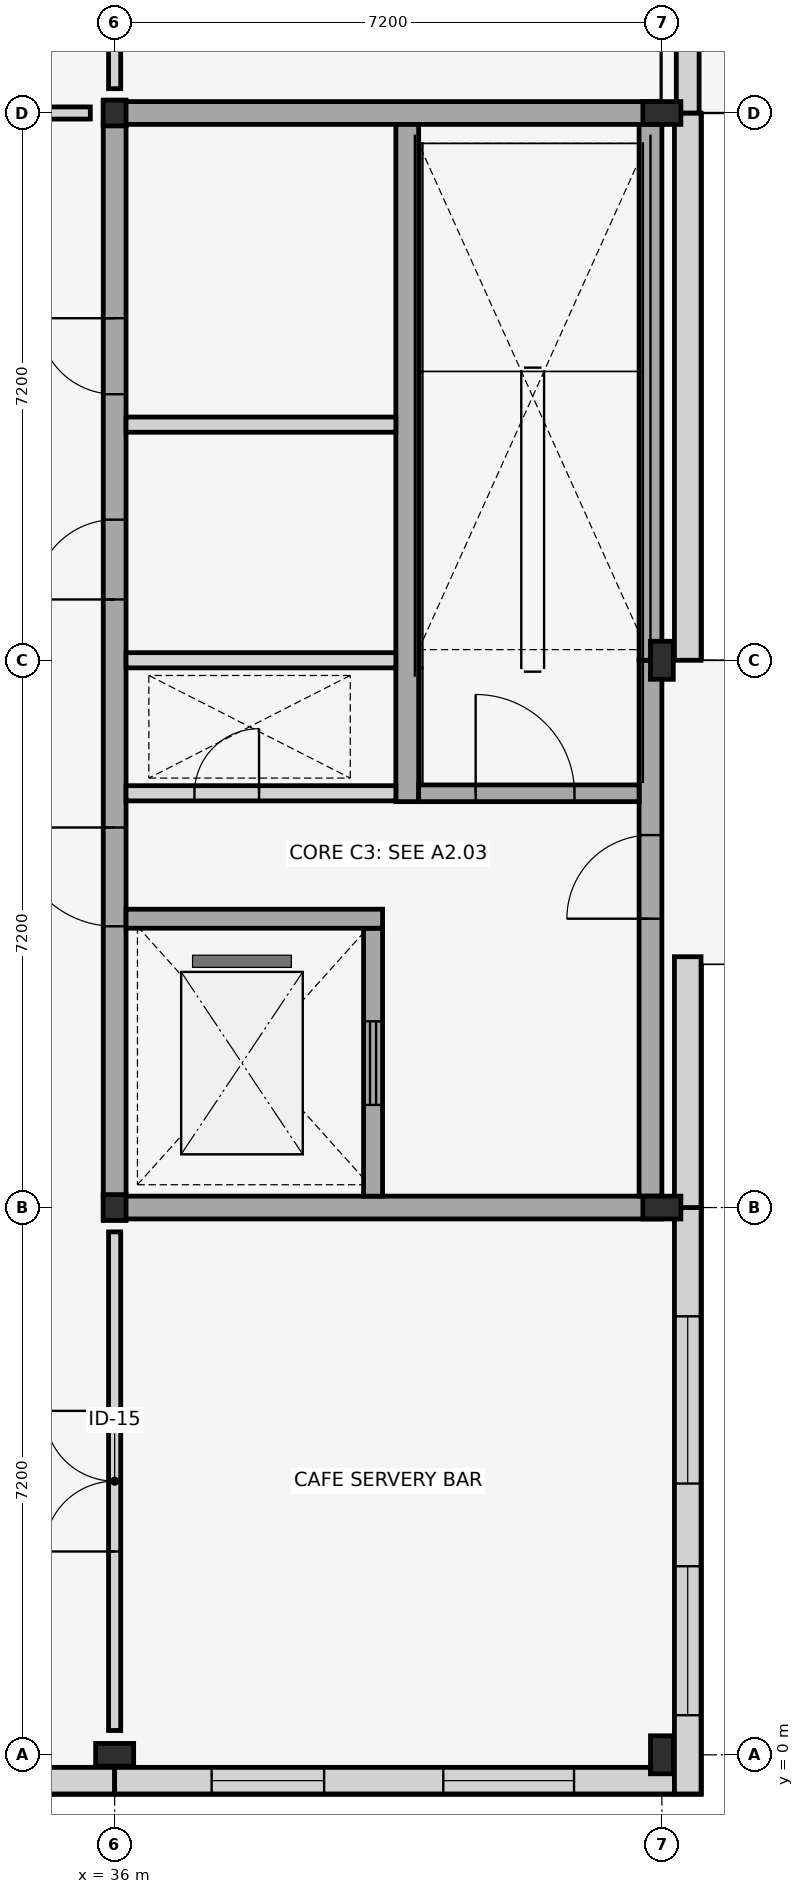
"""IFC4 building model, lengths in metres.
Left out: names, types, materials, properties, quantities, classifications, styles, units other than length and angle.
Written with IfcOpenShell. Run it as: python <this file> out.ifc"""

import sys

from ifc_helpers import new_model, si_unit, direction, frame, frame_2d, origin, origin_2d, place, context, subcontext, project, spatial, rectangle, i_section, extrude, element, fill, save


model = new_model("IFC4")
c1 = context("Model", 3, precision=1e-05, world=origin(), true_north=direction((0.0, 1.0)))
c2 = subcontext(c1, "Body", "Model", "MODEL_VIEW")
j1 = project(units=[si_unit("LENGTHUNIT", "METRE"), si_unit("PLANEANGLEUNIT", "RADIAN")], contexts=[c1])
p1 = place(None, origin())
s1 = spatial("IfcSite", under=j1, at=p1, CompositionType="ELEMENT")
p2 = place(p1, origin())
s2 = spatial("IfcBuilding", under=s1, at=p2, CompositionType="ELEMENT")
p3 = place(p2, origin())
s3 = spatial("IfcBuildingStorey", under=s2, at=p3, CompositionType="ELEMENT", Elevation=0.0)
p4 = place(p3, frame((36.0, 0.0, 0.0), z_axis=(0.0, 0.0, 1.0), x_axis=(0.0, 1.0, 0.0)))
e1 = element("IfcColumn", 1, at=p4, inside=s3, PredefinedType="COLUMN", context=c2, shape_type="SweptSolid", body=[
    extrude(i_section(OverallWidth=0.3, OverallDepth=0.5, WebThickness=0.014, FlangeThickness=0.028, FilletRadius=0.027, at=origin_2d()), origin(), (0.0, 0.0, 1.0), 4.5),
])
for number, where, z_axis, x_axis in (
    (2, (36.0, 7.2, 0.0), (0.0, 0.0, 1.0), (1.0, 0.0, 0.0)),
    (3, (36.0, 21.6, 0.0), (0.0, 0.0, 1.0), (1.0, 0.0, 0.0)),
):
    element("IfcColumn", number, at=place(p3, frame(where, z_axis=z_axis, x_axis=x_axis)), inside=s3, PredefinedType="COLUMN", context=c2, shape_type="SweptSolid", body=[
        extrude(i_section(OverallWidth=0.3, OverallDepth=0.34, WebThickness=0.012, FlangeThickness=0.021, FilletRadius=0.027, at=origin_2d()), origin(), (0.0, 0.0, 1.0), 4.5),
    ])
for number, where, z_axis, x_axis in (
    (4, (43.2, 0.0, 0.0), (0.0, 0.0, 1.0), (1.0, 0.0, 0.0)),
    (5, (43.2, 7.2, 0.0), (0.0, 0.0, 1.0), (0.0, 1.0, 0.0)),
    (6, (43.2, 14.4, 0.0), (0.0, 0.0, 1.0), (1.0, 0.0, 0.0)),
    (7, (43.2, 21.6, 0.0), (0.0, 0.0, 1.0), (0.0, 1.0, 0.0)),
):
    element("IfcColumn", number, at=place(p3, frame(where, z_axis=z_axis, x_axis=x_axis)), inside=s3, PredefinedType="COLUMN", context=c2, shape_type="SweptSolid", body=[
        extrude(i_section(OverallWidth=0.3, OverallDepth=0.5, WebThickness=0.014, FlangeThickness=0.028, FilletRadius=0.027, at=origin_2d()), origin(), (0.0, 0.0, 1.0), 4.5),
    ])
p5 = place(p3, frame((28.8, -0.34, 0.0), z_axis=(0.0, 0.0, 1.0), x_axis=(1.0, 0.0, 0.0)))
e8 = element("IfcWall", 8, at=p5, inside=s3, PredefinedType="STANDARD", context=c2, shape_type="SweptSolid", body=[
    extrude(rectangle(XDim=7.2, YDim=0.35, at=frame_2d((3.6, 0.0))), origin(), (0.0, 0.0, 1.0), 4.5),
])
p6 = place(p5, frame((1.516, 0.0, 0.9)))
e9 = element("IfcOpeningElement", 9, at=p6, cuts=e8, PredefinedType="OPENING", context=c2, shape_type="SweptSolid", body=[
    extrude(rectangle(XDim=1.0, YDim=2.1, at=frame_2d((0.5, 1.05))), frame((0.0, 0.185, 0.0), z_axis=(0.0, -1.0, 0.0), x_axis=(1.0, 0.0, 0.0)), (0.0, 0.0, 1.0), 0.37),
])
p7 = place(p5, frame((4.564, 0.0, 0.9)))
e10 = element("IfcOpeningElement", 10, at=p7, cuts=e8, PredefinedType="OPENING", context=c2, shape_type="SweptSolid", body=[
    extrude(rectangle(XDim=1.24, YDim=2.1, at=frame_2d((0.62, 1.05))), frame((0.0, 0.185, 0.0), z_axis=(0.0, -1.0, 0.0), x_axis=(1.0, 0.0, 0.0)), (0.0, 0.0, 1.0), 0.37),
])
p8 = place(p3, frame((36.0, -0.34, 0.0), z_axis=(0.0, 0.0, 1.0), x_axis=(1.0, 0.0, 0.0)))
e11 = element("IfcWall", 11, at=p8, inside=s3, PredefinedType="STANDARD", context=c2, shape_type="SweptSolid", body=[
    extrude(rectangle(XDim=7.365, YDim=0.35, at=frame_2d((3.683, 0.0))), origin(), (0.0, 0.0, 1.0), 4.5),
])
p9 = place(p8, frame((1.276, 0.0, 0.9)))
e12 = element("IfcOpeningElement", 12, at=p9, cuts=e11, PredefinedType="OPENING", context=c2, shape_type="SweptSolid", body=[
    extrude(rectangle(XDim=1.48, YDim=2.1, at=frame_2d((0.74, 1.05))), frame((0.0, 0.185, 0.0), z_axis=(0.0, -1.0, 0.0), x_axis=(1.0, 0.0, 0.0)), (0.0, 0.0, 1.0), 0.37),
])
p10 = place(p8, frame((4.324, 0.0, 0.9)))
e13 = element("IfcOpeningElement", 13, at=p10, cuts=e11, PredefinedType="OPENING", context=c2, shape_type="SweptSolid", body=[
    extrude(rectangle(XDim=1.72, YDim=2.1, at=frame_2d((0.86, 1.05))), frame((0.0, 0.185, 0.0), z_axis=(0.0, -1.0, 0.0), x_axis=(1.0, 0.0, 0.0)), (0.0, 0.0, 1.0), 0.37),
])
p11 = place(p3, frame((43.54, -0.515, 0.0), z_axis=(0.0, 0.0, 1.0), x_axis=(0.0, 1.0, 0.0)))
e14 = element("IfcWall", 14, at=p11, inside=s3, PredefinedType="STANDARD", context=c2, shape_type="SweptSolid", body=[
    extrude(rectangle(XDim=7.715, YDim=0.35, at=frame_2d((3.857, 0.0))), origin(), (0.0, 0.0, 1.0), 4.5),
])
p12 = place(p11, frame((1.036, 0.0, 0.9)))
e15 = element("IfcOpeningElement", 15, at=p12, cuts=e14, PredefinedType="OPENING", context=c2, shape_type="SweptSolid", body=[
    extrude(rectangle(XDim=1.96, YDim=2.1, at=frame_2d((0.98, 1.05))), frame((0.0, 0.185, 0.0), z_axis=(0.0, -1.0, 0.0), x_axis=(1.0, 0.0, 0.0)), (0.0, 0.0, 1.0), 0.37),
])
p13 = place(p11, frame((4.084, 0.0, 0.9)))
e16 = element("IfcOpeningElement", 16, at=p13, cuts=e14, PredefinedType="OPENING", context=c2, shape_type="SweptSolid", body=[
    extrude(rectangle(XDim=2.2, YDim=2.1, at=frame_2d((1.1, 1.05))), frame((0.0, 0.185, 0.0), z_axis=(0.0, -1.0, 0.0), x_axis=(1.0, 0.0, 0.0)), (0.0, 0.0, 1.0), 0.37),
])
p14 = place(p3, frame((43.54, 7.2, 0.0), z_axis=(0.0, 0.0, 1.0), x_axis=(0.0, 1.0, 0.0)))
e17 = element("IfcWall", 17, at=p14, inside=s3, PredefinedType="STANDARD", context=c2, shape_type="SweptSolid", body=[
    extrude(rectangle(XDim=3.3, YDim=0.35, at=frame_2d((1.65, 0.0))), origin(), (0.0, 0.0, 1.0), 4.5),
])
p15 = place(p3, frame((43.54, 14.4, 0.0), z_axis=(0.0, 0.0, 1.0), x_axis=(0.0, 1.0, 0.0)))
e18 = element("IfcWall", 18, at=p15, inside=s3, PredefinedType="STANDARD", context=c2, shape_type="SweptSolid", body=[
    extrude(rectangle(XDim=7.2, YDim=0.35, at=frame_2d((3.6, 0.0))), origin(), (0.0, 0.0, 1.0), 4.5),
])
p16 = place(p3, frame((43.54, 21.6, 0.0), z_axis=(0.0, 0.0, 1.0), x_axis=(0.0, 1.0, 0.0)))
e19 = element("IfcWall", 19, at=p16, inside=s3, PredefinedType="STANDARD", context=c2, shape_type="SweptSolid", body=[
    extrude(rectangle(XDim=7.715, YDim=0.3, at=frame_2d((3.857, 0.0))), origin(), (0.0, 0.0, 1.0), 3.95),
])
p17 = place(p16, frame((2.65, 0.0, 0.0)))
e20 = element("IfcOpeningElement", 20, at=p17, cuts=e19, PredefinedType="OPENING", context=c2, shape_type="SweptSolid", body=[
    extrude(rectangle(XDim=1.9, YDim=2.45, at=frame_2d((0.95, 1.225))), frame((0.0, 0.16, 0.0), z_axis=(0.0, -1.0, 0.0), x_axis=(1.0, 0.0, 0.0)), (0.0, 0.0, 1.0), 0.32),
])
for number, where, z_axis, x_axis in (
    (21, (35.85, 7.2, 0.0), (0.0, 0.0, 1.0), (1.0, 0.0, 0.0)),
    (22, (35.85, 21.6, 0.0), (0.0, 0.0, 1.0), (1.0, 0.0, 0.0)),
):
    element("IfcWall", number, at=place(p3, frame(where, z_axis=z_axis, x_axis=x_axis)), inside=s3, PredefinedType="SHEAR", context=c2, shape_type="SweptSolid", body=[
        extrude(rectangle(XDim=7.35, YDim=0.3, at=frame_2d((3.675, 0.0))), origin(), (0.0, 0.0, 1.0), 4.28),
    ])
p18 = place(p3, frame((43.05, 7.35, 0.0), z_axis=(0.0, 0.0, 1.0), x_axis=(0.0, 1.0, 0.0)))
e23 = element("IfcWall", 23, at=p18, inside=s3, PredefinedType="SHEAR", context=c2, shape_type="SweptSolid", body=[
    extrude(rectangle(XDim=7.05, YDim=0.3, at=frame_2d((3.525, 0.0))), origin(), (0.0, 0.0, 1.0), 4.28),
])
p19 = place(p18, frame((3.65, 0.0, 0.0)))
e24 = element("IfcOpeningElement", 24, at=p19, cuts=e23, PredefinedType="OPENING", context=c2, shape_type="SweptSolid", body=[
    extrude(rectangle(XDim=1.1, YDim=2.2, at=frame_2d((0.55, 1.1))), frame((0.0, 0.16, 0.0), z_axis=(0.0, -1.0, 0.0), x_axis=(1.0, 0.0, 0.0)), (0.0, 0.0, 1.0), 0.32),
])
p20 = place(p3, frame((43.05, 14.4, 0.0), z_axis=(0.0, 0.0, 1.0), x_axis=(0.0, 1.0, 0.0)))
e25 = element("IfcWall", 25, at=p20, inside=s3, PredefinedType="SHEAR", context=c2, shape_type="SweptSolid", body=[
    extrude(rectangle(XDim=7.05, YDim=0.3, at=frame_2d((3.525, 0.0))), origin(), (0.0, 0.0, 1.0), 4.28),
])
p21 = place(p3, frame((36.0, 7.35, 0.0), z_axis=(0.0, 0.0, 1.0), x_axis=(0.0, 1.0, 0.0)))
e26 = element("IfcWall", 26, at=p21, inside=s3, PredefinedType="SHEAR", context=c2, shape_type="SweptSolid", body=[
    extrude(rectangle(XDim=14.1, YDim=0.3, at=frame_2d((7.05, 0.0))), origin(), (0.0, 0.0, 1.0), 4.28),
])
p22 = place(p21, frame((3.55, 0.0, 0.0)))
e27 = element("IfcOpeningElement", 27, at=p22, cuts=e26, PredefinedType="OPENING", context=c2, shape_type="SweptSolid", body=[
    extrude(rectangle(XDim=1.3, YDim=2.2, at=frame_2d((0.65, 1.1))), frame((0.0, 0.16, 0.0), z_axis=(0.0, -1.0, 0.0), x_axis=(1.0, 0.0, 0.0)), (0.0, 0.0, 1.0), 0.32),
])
p23 = place(p21, frame((7.85, 0.0, 0.0)))
e28 = element("IfcOpeningElement", 28, at=p23, cuts=e26, PredefinedType="OPENING", context=c2, shape_type="SweptSolid", body=[
    extrude(rectangle(XDim=1.05, YDim=2.15, at=frame_2d((0.525, 1.075))), frame((0.0, 0.16, 0.0), z_axis=(0.0, -1.0, 0.0), x_axis=(1.0, 0.0, 0.0)), (0.0, 0.0, 1.0), 0.32),
])
p24 = place(p21, frame((10.55, 0.0, 0.0)))
e29 = element("IfcOpeningElement", 29, at=p24, cuts=e26, PredefinedType="OPENING", context=c2, shape_type="SweptSolid", body=[
    extrude(rectangle(XDim=1.0, YDim=2.15, at=frame_2d((0.5, 1.075))), frame((0.0, 0.16, 0.0), z_axis=(0.0, -1.0, 0.0), x_axis=(1.0, 0.0, 0.0)), (0.0, 0.0, 1.0), 0.32),
])
p25 = place(p3, frame((39.4, 7.35, 0.0), z_axis=(0.0, 0.0, 1.0), x_axis=(0.0, 1.0, 0.0)))
e30 = element("IfcWall", 30, at=p25, inside=s3, PredefinedType="SHEAR", context=c2, shape_type="SweptSolid", body=[
    extrude(rectangle(XDim=3.525, YDim=0.25, at=frame_2d((1.762, 0.0))), origin(), (0.0, 0.0, 1.0), 4.28),
])
p26 = place(p25, frame((1.2, 0.0, 0.0)))
e31 = element("IfcOpeningElement", 31, at=p26, cuts=e30, PredefinedType="OPENING", context=c2, shape_type="SweptSolid", body=[
    extrude(rectangle(XDim=1.1, YDim=2.15, at=frame_2d((0.55, 1.075))), frame((0.0, 0.135, 0.0), z_axis=(0.0, -1.0, 0.0), x_axis=(1.0, 0.0, 0.0)), (0.0, 0.0, 1.0), 0.27),
])
p27 = place(p3, frame((39.85, 12.54, 0.0), z_axis=(0.0, 0.0, 1.0), x_axis=(0.0, 1.0, 0.0)))
e32 = element("IfcWall", 32, at=p27, inside=s3, PredefinedType="SHEAR", context=c2, shape_type="SweptSolid", body=[
    extrude(rectangle(XDim=8.91, YDim=0.3, at=frame_2d((4.455, 0.0))), origin(), (0.0, 0.0, 1.0), 4.28),
])
p28 = place(p3, frame((36.15, 12.65, 0.0), z_axis=(0.0, 0.0, 1.0), x_axis=(1.0, 0.0, 0.0)))
e33 = element("IfcWall", 33, at=p28, inside=s3, PredefinedType="PLUMBINGWALL", context=c2, shape_type="SweptSolid", body=[
    extrude(rectangle(XDim=3.55, YDim=0.2, at=frame_2d((1.775, 0.0))), origin(), (0.0, 0.0, 1.0), 3.7),
])
p29 = place(p28, frame((0.9, 0.0, 0.0)))
e34 = element("IfcOpeningElement", 34, at=p29, cuts=e33, PredefinedType="OPENING", context=c2, shape_type="SweptSolid", body=[
    extrude(rectangle(XDim=0.85, YDim=2.05, at=frame_2d((0.425, 1.025))), frame((0.0, 0.11, 0.0), z_axis=(0.0, -1.0, 0.0), x_axis=(1.0, 0.0, 0.0)), (0.0, 0.0, 1.0), 0.22),
])
p30 = place(p3, frame((40.0, 12.65, 0.0), z_axis=(0.0, 0.0, 1.0), x_axis=(1.0, 0.0, 0.0)))
e35 = element("IfcWall", 35, at=p30, inside=s3, PredefinedType="SHEAR", context=c2, shape_type="SweptSolid", body=[
    extrude(rectangle(XDim=2.9, YDim=0.22, at=frame_2d((1.45, 0.0))), origin(), (0.0, 0.0, 1.0), 4.28),
])
p31 = place(p30, frame((0.75, 0.0, 0.0)))
e36 = element("IfcOpeningElement", 36, at=p31, cuts=e35, PredefinedType="OPENING", context=c2, shape_type="SweptSolid", body=[
    extrude(rectangle(XDim=1.3, YDim=2.2, at=frame_2d((0.65, 1.1))), frame((0.0, 0.12, 0.0), z_axis=(0.0, -1.0, 0.0), x_axis=(1.0, 0.0, 0.0)), (0.0, 0.0, 1.0), 0.24),
])
p32 = place(p3, frame((36.15, 11.0, 0.0), z_axis=(0.0, 0.0, 1.0), x_axis=(1.0, 0.0, 0.0)))
e37 = element("IfcWall", 37, at=p32, inside=s3, PredefinedType="SHEAR", context=c2, shape_type="SweptSolid", body=[
    extrude(rectangle(XDim=3.375, YDim=0.25, at=frame_2d((1.688, 0.0))), origin(), (0.0, 0.0, 1.0), 4.28),
])
for number, where, z_axis, x_axis in (
    (38, (36.15, 14.4, 0.0), (0.0, 0.0, 1.0), (1.0, 0.0, 0.0)),
    (39, (36.15, 17.5, 0.0), (0.0, 0.0, 1.0), (1.0, 0.0, 0.0)),
):
    element("IfcWall", number, at=place(p3, frame(where, z_axis=z_axis, x_axis=x_axis)), inside=s3, PredefinedType="PLUMBINGWALL", context=c2, shape_type="SweptSolid", body=[
        extrude(rectangle(XDim=3.55, YDim=0.2, at=frame_2d((1.775, 0.0))), origin(), (0.0, 0.0, 1.0), 3.7),
    ])
p33 = place(p3, frame((29.12, 21.6, 0.0), z_axis=(0.0, 0.0, 1.0), x_axis=(1.0, 0.0, 0.0)))
e40 = element("IfcWall", 40, at=p33, inside=s3, PredefinedType="PARTITIONING", context=c2, shape_type="SweptSolid", body=[
    extrude(rectangle(XDim=6.56, YDim=0.16, at=frame_2d((3.28, 0.0))), origin(), (0.0, 0.0, 1.0), 3.45),
])
p34 = place(p33, frame((2.405, 0.0, 0.0)))
e41 = element("IfcOpeningElement", 41, at=p34, cuts=e40, PredefinedType="OPENING", context=c2, shape_type="SweptSolid", body=[
    extrude(rectangle(XDim=1.75, YDim=2.45, at=frame_2d((0.875, 1.225))), frame((0.0, 0.09, 0.0), z_axis=(0.0, -1.0, 0.0), x_axis=(1.0, 0.0, 0.0)), (0.0, 0.0, 1.0), 0.18),
])
p35 = place(p3, frame((36.0, 0.32, 0.0), z_axis=(0.0, 0.0, 1.0), x_axis=(0.0, 1.0, 0.0)))
e42 = element("IfcWall", 42, at=p35, inside=s3, PredefinedType="PARTITIONING", context=c2, shape_type="SweptSolid", body=[
    extrude(rectangle(XDim=6.56, YDim=0.16, at=frame_2d((3.28, 0.0))), origin(), (0.0, 0.0, 1.0), 3.45),
])
p36 = place(p35, frame((2.355, 0.0, 0.0)))
e43 = element("IfcOpeningElement", 43, at=p36, cuts=e42, PredefinedType="OPENING", context=c2, shape_type="SweptSolid", body=[
    extrude(rectangle(XDim=1.85, YDim=2.5, at=frame_2d((0.925, 1.25))), frame((0.0, 0.09, 0.0), z_axis=(0.0, -1.0, 0.0), x_axis=(1.0, 0.0, 0.0)), (0.0, 0.0, 1.0), 0.18),
])
p37 = place(p3, frame((36.0, 21.92, 0.0), z_axis=(0.0, 0.0, 1.0), x_axis=(0.0, 1.0, 0.0)))
e44 = element("IfcWall", 44, at=p37, inside=s3, PredefinedType="PARTITIONING", context=c2, shape_type="SweptSolid", body=[
    extrude(rectangle(XDim=6.56, YDim=0.16, at=frame_2d((3.28, 0.0))), origin(), (0.0, 0.0, 1.0), 3.45),
])
p38 = place(p37, frame((2.255, 0.0, 0.0)))
e45 = element("IfcOpeningElement", 45, at=p38, cuts=e44, PredefinedType="OPENING", context=c2, shape_type="SweptSolid", body=[
    extrude(rectangle(XDim=2.05, YDim=2.55, at=frame_2d((1.025, 1.275))), frame((0.0, 0.09, 0.0), z_axis=(0.0, -1.0, 0.0), x_axis=(1.0, 0.0, 0.0)), (0.0, 0.0, 1.0), 0.18),
])
p39 = place(p9, origin())
e46 = element("IfcWindow", 46, at=p39, inside=s3, PartitioningType="SINGLE_PANEL", PredefinedType="WINDOW", context=c2, shape_type="SweptSolid", body=[
    extrude(rectangle(XDim=1.48, YDim=2.1, at=frame_2d((0.74, 1.05))), frame((0.0, 0.03, 0.0), z_axis=(0.0, -1.0, 0.0), x_axis=(1.0, 0.0, 0.0)), (0.0, 0.0, 1.0), 0.06),
])
fill(e12, e46)
p40 = place(p10, origin())
e47 = element("IfcWindow", 47, at=p40, inside=s3, PartitioningType="SINGLE_PANEL", PredefinedType="WINDOW", context=c2, shape_type="SweptSolid", body=[
    extrude(rectangle(XDim=1.72, YDim=2.1, at=frame_2d((0.86, 1.05))), frame((0.0, 0.03, 0.0), z_axis=(0.0, -1.0, 0.0), x_axis=(1.0, 0.0, 0.0)), (0.0, 0.0, 1.0), 0.06),
])
fill(e13, e47)
p41 = place(p12, origin())
e48 = element("IfcWindow", 48, at=p41, inside=s3, PartitioningType="SINGLE_PANEL", PredefinedType="WINDOW", context=c2, shape_type="SweptSolid", body=[
    extrude(rectangle(XDim=1.96, YDim=2.1, at=frame_2d((0.98, 1.05))), frame((0.0, 0.03, 0.0), z_axis=(0.0, -1.0, 0.0), x_axis=(1.0, 0.0, 0.0)), (0.0, 0.0, 1.0), 0.06),
])
fill(e15, e48)
p42 = place(p13, origin())
e49 = element("IfcWindow", 49, at=p42, inside=s3, PartitioningType="SINGLE_PANEL", PredefinedType="WINDOW", context=c2, shape_type="SweptSolid", body=[
    extrude(rectangle(XDim=2.2, YDim=2.1, at=frame_2d((1.1, 1.05))), frame((0.0, 0.03, 0.0), z_axis=(0.0, -1.0, 0.0), x_axis=(1.0, 0.0, 0.0)), (0.0, 0.0, 1.0), 0.06),
])
fill(e16, e49)
p43 = place(p19, origin())
e50 = element("IfcDoor", 50, at=p43, inside=s3, OperationType="SINGLE_SWING_LEFT", PredefinedType="DOOR", context=c2, shape_type="SweptSolid", body=[
    extrude(rectangle(XDim=1.1, YDim=2.2, at=frame_2d((0.55, 1.1))), frame((0.0, 0.025, 0.0), z_axis=(0.0, -1.0, 0.0), x_axis=(1.0, 0.0, 0.0)), (0.0, 0.0, 1.0), 0.05),
])
fill(e24, e50)
p44 = place(p22, origin())
e51 = element("IfcDoor", 51, at=p44, inside=s3, OperationType="SINGLE_SWING_RIGHT", PredefinedType="DOOR", context=c2, shape_type="SweptSolid", body=[
    extrude(rectangle(XDim=1.3, YDim=2.2, at=frame_2d((0.65, 1.1))), frame((0.0, 0.025, 0.0), z_axis=(0.0, -1.0, 0.0), x_axis=(1.0, 0.0, 0.0)), (0.0, 0.0, 1.0), 0.05),
])
fill(e27, e51)
p45 = place(p23, origin())
e52 = element("IfcDoor", 52, at=p45, inside=s3, OperationType="SINGLE_SWING_LEFT", PredefinedType="DOOR", context=c2, shape_type="SweptSolid", body=[
    extrude(rectangle(XDim=1.05, YDim=2.15, at=frame_2d((0.525, 1.075))), frame((0.0, 0.025, 0.0), z_axis=(0.0, -1.0, 0.0), x_axis=(1.0, 0.0, 0.0)), (0.0, 0.0, 1.0), 0.05),
])
fill(e28, e52)
p46 = place(p24, origin())
e53 = element("IfcDoor", 53, at=p46, inside=s3, OperationType="SINGLE_SWING_RIGHT", PredefinedType="DOOR", context=c2, shape_type="SweptSolid", body=[
    extrude(rectangle(XDim=1.0, YDim=2.15, at=frame_2d((0.5, 1.075))), frame((0.0, 0.025, 0.0), z_axis=(0.0, -1.0, 0.0), x_axis=(1.0, 0.0, 0.0)), (0.0, 0.0, 1.0), 0.05),
])
fill(e29, e53)
p47 = place(p26, origin())
e54 = element("IfcDoor", 54, at=p47, inside=s3, OperationType="SLIDING_TO_LEFT", PredefinedType="DOOR", context=c2, shape_type="SweptSolid", body=[
    extrude(rectangle(XDim=1.1, YDim=2.15, at=frame_2d((0.55, 1.075))), frame((0.0, 0.025, 0.0), z_axis=(0.0, -1.0, 0.0), x_axis=(1.0, 0.0, 0.0)), (0.0, 0.0, 1.0), 0.05),
])
fill(e31, e54)
p48 = place(p29, origin())
e55 = element("IfcDoor", 55, at=p48, inside=s3, OperationType="SINGLE_SWING_RIGHT", PredefinedType="TRAPDOOR", context=c2, shape_type="SweptSolid", body=[
    extrude(rectangle(XDim=0.85, YDim=2.05, at=frame_2d((0.425, 1.025))), frame((0.0, 0.025, 0.0), z_axis=(0.0, -1.0, 0.0), x_axis=(1.0, 0.0, 0.0)), (0.0, 0.0, 1.0), 0.05),
])
fill(e34, e55)
p49 = place(p31, origin())
e56 = element("IfcDoor", 56, at=p49, inside=s3, OperationType="SINGLE_SWING_LEFT", PredefinedType="DOOR", context=c2, shape_type="SweptSolid", body=[
    extrude(rectangle(XDim=1.3, YDim=2.2, at=frame_2d((0.65, 1.1))), frame((0.0, 0.025, 0.0), z_axis=(0.0, -1.0, 0.0), x_axis=(1.0, 0.0, 0.0)), (0.0, 0.0, 1.0), 0.05),
])
fill(e36, e56)
p50 = place(p36, origin())
e57 = element("IfcDoor", 57, at=p50, inside=s3, OperationType="DOUBLE_DOOR_SINGLE_SWING", PredefinedType="DOOR", context=c2, shape_type="SweptSolid", body=[
    extrude(rectangle(XDim=1.85, YDim=2.5, at=frame_2d((0.925, 1.25))), frame((0.0, 0.025, 0.0), z_axis=(0.0, -1.0, 0.0), x_axis=(1.0, 0.0, 0.0)), (0.0, 0.0, 1.0), 0.05),
])
fill(e43, e57)
save(model, sys.argv[1])
